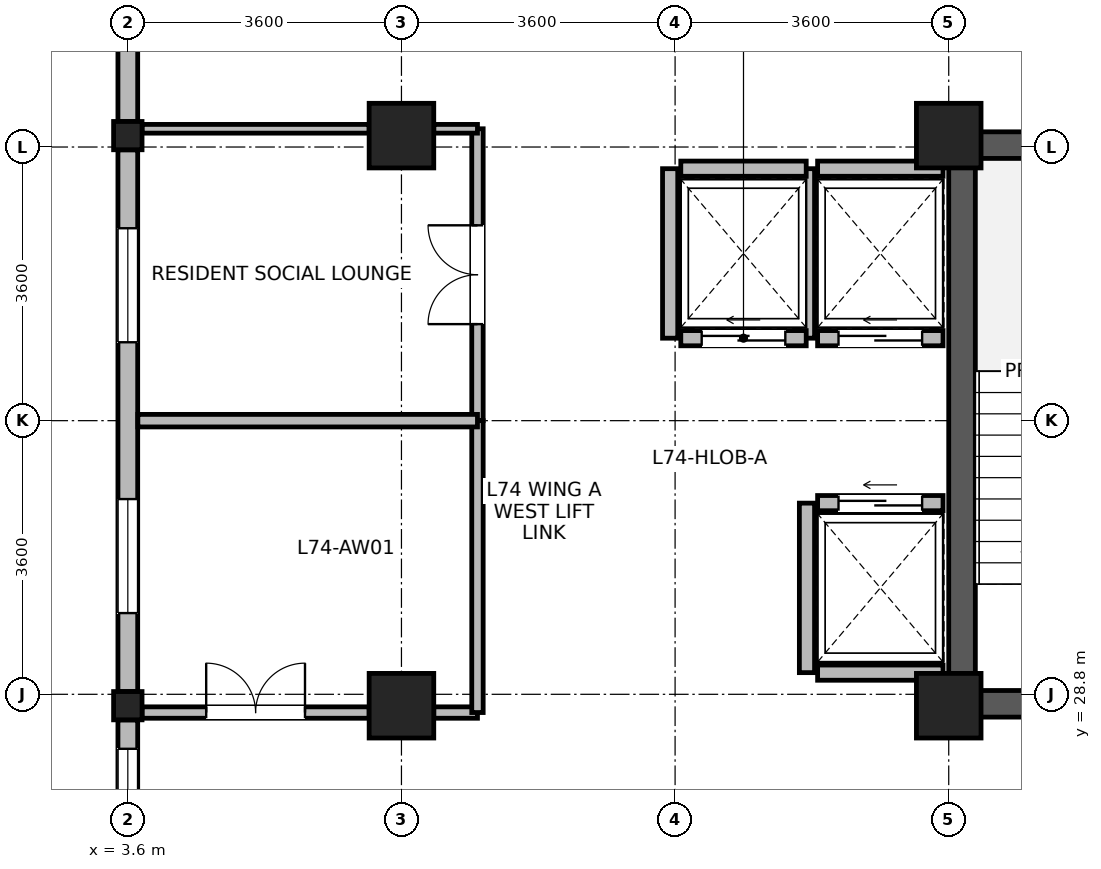
"""IFC4 building model, lengths in metres.
Left out: names, types, materials, properties, quantities, classifications, styles, units other than length and angle.
Written with IfcOpenShell. Run it as: python <this file> out.ifc"""

import sys

from ifc_helpers import new_model, si_unit, direction, frame, frame_2d, origin, origin_2d, place, context, subcontext, project, spatial, rectangle, i_section, extrude, source, transform, mapped, element, fill, save


model = new_model("IFC4")
c1 = context("Model", 3, precision=1e-05, world=origin(), true_north=direction((0.0, 1.0)))
c2 = subcontext(c1, "Body", "Model", "MODEL_VIEW")
j1 = project(units=[si_unit("LENGTHUNIT", "METRE"), si_unit("PLANEANGLEUNIT", "RADIAN")], contexts=[c1])
p1 = place(None, origin())
s1 = spatial("IfcSite", under=j1, at=p1, CompositionType="ELEMENT")
p2 = place(p1, origin())
s2 = spatial("IfcBuilding", under=s1, at=p2, CompositionType="ELEMENT")
p3 = place(p2, frame((0.0, 0.0, 286.9)))
s3 = spatial("IfcBuildingStorey", under=s2, at=p3, CompositionType="ELEMENT", Elevation=286.9)
p4 = place(p3, frame((14.575, 28.5, 0.0), z_axis=(0.0, 0.0, 1.0), x_axis=(0.0, 1.0, 0.0)))
e1 = element("IfcWall", 1, at=p4, inside=s3, PredefinedType="SHEAR", context=c2, shape_type="SweptSolid", body=[
    extrude(rectangle(XDim=7.7, YDim=0.35, at=frame_2d((3.85, 0.0))), origin(), (0.0, 0.0, 1.0), 3.475),
])
for number, where, z_axis, x_axis in (
    (2, (14.75, 28.675, 0.0), (0.0, 0.0, 1.0), (1.0, 0.0, 0.0)),
    (3, (14.75, 36.025, 0.0), (0.0, 0.0, 1.0), (1.0, 0.0, 0.0)),
):
    element("IfcWall", number, at=place(p3, frame(where, z_axis=z_axis, x_axis=x_axis)), inside=s3, PredefinedType="SHEAR", context=c2, shape_type="SweptSolid", body=[
        extrude(rectangle(XDim=3.2, YDim=0.35, at=frame_2d((1.6, 0.0))), origin(), (0.0, 0.0, 1.0), 3.475),
    ])
m1 = source(origin(), c2, "Body", "SweptSolid", [
    extrude(rectangle(XDim=0.85, YDim=0.85, at=origin_2d()), origin(), (0.0, 0.0, 1.0), 3.7),
])
for number, where, z_axis, x_axis in (
    (4, (7.2, 28.65, 0.0), (0.0, 0.0, 1.0), (1.0, 0.0, 0.0)),
    (5, (7.2, 36.15, 0.0), (0.0, 0.0, 1.0), (1.0, 0.0, 0.0)),
    (6, (14.4, 28.65, 0.0), (0.0, 0.0, 1.0), (1.0, 0.0, 0.0)),
    (7, (14.4, 36.15, 0.0), (0.0, 0.0, 1.0), (1.0, 0.0, 0.0)),
):
    element("IfcColumn", number, at=place(p3, frame(where, z_axis=z_axis, x_axis=x_axis)), inside=s3, PredefinedType="COLUMN", context=c2, shape_type="MappedRepresentation", body=[
        mapped(m1, transform((0.0, 0.0, 0.0), x_axis=(1.0, 0.0, 0.0), y_axis=(0.0, 1.0, 0.0), z_axis=(0.0, 0.0, 1.0), scale=1.0)),
    ])
m2 = source(origin(), c2, "Body", "SweptSolid", [
    extrude(i_section(OverallWidth=0.374, OverallDepth=0.372, WebThickness=0.015, FlangeThickness=0.026, FilletRadius=0.015, at=origin_2d()), origin(), (0.0, 0.0, 1.0), 3.7),
])
for number, where, z_axis, x_axis in (
    (8, (3.6, 28.65, 0.0), (0.0, 0.0, 1.0), (1.0, 0.0, 0.0)),
    (9, (3.6, 36.15, 0.0), (0.0, 0.0, 1.0), (1.0, 0.0, 0.0)),
):
    element("IfcColumn", number, at=place(p3, frame(where, z_axis=z_axis, x_axis=x_axis)), inside=s3, PredefinedType="COLUMN", context=c2, shape_type="MappedRepresentation", body=[
        mapped(m2, transform((0.0, 0.0, 0.0), x_axis=(1.0, 0.0, 0.0), y_axis=(0.0, 1.0, 0.0), z_axis=(0.0, 0.0, 1.0), scale=1.0)),
    ])
p5 = place(p3, frame((3.6, 36.337, 0.0), z_axis=(0.0, 0.0, 1.0), x_axis=(0.0, 1.0, 0.0)))
e10 = element("IfcWall", 10, at=p5, inside=s3, PredefinedType="STANDARD", context=c2, shape_type="SweptSolid", body=[
    extrude(rectangle(XDim=3.393, YDim=0.26, at=frame_2d((1.697, 0.0))), origin(), (0.0, 0.0, 1.0), 3.455),
])
p6 = place(p5, frame((0.947, 0.0, 0.85)))
e11 = element("IfcOpeningElement", 11, at=p6, cuts=e10, PredefinedType="OPENING", context=c2, shape_type="SweptSolid", body=[
    extrude(rectangle(XDim=1.5, YDim=1.85, at=frame_2d((0.75, 0.925))), frame((0.0, 0.14, 0.0), z_axis=(0.0, -1.0, 0.0), x_axis=(1.0, 0.0, 0.0)), (0.0, 0.0, 1.0), 0.28),
])
p7 = place(p3, frame((3.6, 28.837, 0.0), z_axis=(0.0, 0.0, 1.0), x_axis=(0.0, 1.0, 0.0)))
e12 = element("IfcWall", 12, at=p7, inside=s3, PredefinedType="STANDARD", context=c2, shape_type="SweptSolid", body=[
    extrude(rectangle(XDim=7.126, YDim=0.26, at=frame_2d((3.563, 0.0))), origin(), (0.0, 0.0, 1.0), 3.055),
])
p8 = place(p7, frame((1.031, 0.0, 0.85)))
e13 = element("IfcOpeningElement", 13, at=p8, cuts=e12, PredefinedType="OPENING", context=c2, shape_type="SweptSolid", body=[
    extrude(rectangle(XDim=1.5, YDim=1.85, at=frame_2d((0.75, 0.925))), frame((0.0, 0.14, 0.0), z_axis=(0.0, -1.0, 0.0), x_axis=(1.0, 0.0, 0.0)), (0.0, 0.0, 1.0), 0.28),
])
p9 = place(p7, frame((4.594, 0.0, 0.85)))
e14 = element("IfcOpeningElement", 14, at=p9, cuts=e12, PredefinedType="OPENING", context=c2, shape_type="SweptSolid", body=[
    extrude(rectangle(XDim=1.5, YDim=1.85, at=frame_2d((0.75, 0.925))), frame((0.0, 0.14, 0.0), z_axis=(0.0, -1.0, 0.0), x_axis=(1.0, 0.0, 0.0)), (0.0, 0.0, 1.0), 0.28),
])
p10 = place(p3, frame((3.6, 25.07, 0.0), z_axis=(0.0, 0.0, 1.0), x_axis=(0.0, 1.0, 0.0)))
e15 = element("IfcWall", 15, at=p10, inside=s3, PredefinedType="STANDARD", context=c2, shape_type="SweptSolid", body=[
    extrude(rectangle(XDim=3.393, YDim=0.26, at=frame_2d((1.696, 0.0))), origin(), (0.0, 0.0, 1.0), 3.455),
])
p11 = place(p10, frame((2.063, 0.0, 0.85)))
e16 = element("IfcOpeningElement", 16, at=p11, cuts=e15, PredefinedType="OPENING", context=c2, shape_type="SweptSolid", body=[
    extrude(rectangle(XDim=0.95, YDim=1.75, at=frame_2d((0.475, 0.875))), frame((0.0, 0.14, 0.0), z_axis=(0.0, -1.0, 0.0), x_axis=(1.0, 0.0, 0.0)), (0.0, 0.0, 1.0), 0.28),
])
p12 = place(p3, frame((12.675, 33.485, 0.0), z_axis=(0.0, 0.0, 1.0), x_axis=(1.0, 0.0, 0.0)))
e17 = element("IfcWall", 17, at=p12, inside=s3, PredefinedType="PARTITIONING", context=c2, shape_type="SweptSolid", body=[
    extrude(rectangle(XDim=1.65, YDim=0.2, at=frame_2d((0.825, 0.0))), origin(), (0.0, 0.0, 1.0), 3.455),
])
p13 = place(p12, frame((0.275, 0.0, 0.0)))
e18 = element("IfcOpeningElement", 18, at=p13, cuts=e17, PredefinedType="OPENING", context=c2, shape_type="SweptSolid", body=[
    extrude(rectangle(XDim=1.1, YDim=2.12, at=frame_2d((0.55, 1.06))), frame((0.0, 0.11, 0.0), z_axis=(0.0, -1.0, 0.0), x_axis=(1.0, 0.0, 0.0)), (0.0, 0.0, 1.0), 0.22),
])
p14 = place(p3, frame((12.675, 35.715, 0.0), z_axis=(0.0, 0.0, 1.0), x_axis=(1.0, 0.0, 0.0)))
e19 = element("IfcWall", 19, at=p14, inside=s3, PredefinedType="PARTITIONING", context=c2, shape_type="SweptSolid", body=[
    extrude(rectangle(XDim=1.65, YDim=0.2, at=frame_2d((0.825, 0.0))), origin(), (0.0, 0.0, 1.0), 3.455),
])
p15 = place(p3, frame((12.535, 33.485, 0.0), z_axis=(0.0, 0.0, 1.0), x_axis=(0.0, 1.0, 0.0)))
e20 = element("IfcWall", 20, at=p15, inside=s3, PredefinedType="PARTITIONING", context=c2, shape_type="SweptSolid", body=[
    extrude(rectangle(XDim=2.23, YDim=0.2, at=frame_2d((1.115, 0.0))), origin(), (0.0, 0.0, 1.0), 3.455),
])
p16 = place(p3, frame((12.675, 29.085, 0.0), z_axis=(0.0, 0.0, 1.0), x_axis=(1.0, 0.0, 0.0)))
e21 = element("IfcWall", 21, at=p16, inside=s3, PredefinedType="PARTITIONING", context=c2, shape_type="SweptSolid", body=[
    extrude(rectangle(XDim=1.65, YDim=0.2, at=frame_2d((0.825, 0.0))), origin(), (0.0, 0.0, 1.0), 3.455),
])
p17 = place(p3, frame((12.675, 31.315, 0.0), z_axis=(0.0, 0.0, 1.0), x_axis=(1.0, 0.0, 0.0)))
e22 = element("IfcWall", 22, at=p17, inside=s3, PredefinedType="PARTITIONING", context=c2, shape_type="SweptSolid", body=[
    extrude(rectangle(XDim=1.65, YDim=0.2, at=frame_2d((0.825, 0.0))), origin(), (0.0, 0.0, 1.0), 3.455),
])
p18 = place(p17, frame((0.275, 0.0, 0.0)))
e23 = element("IfcOpeningElement", 23, at=p18, cuts=e22, PredefinedType="OPENING", context=c2, shape_type="SweptSolid", body=[
    extrude(rectangle(XDim=1.1, YDim=2.12, at=frame_2d((0.55, 1.06))), frame((0.0, 0.11, 0.0), z_axis=(0.0, -1.0, 0.0), x_axis=(1.0, 0.0, 0.0)), (0.0, 0.0, 1.0), 0.22),
])
p19 = place(p3, frame((12.535, 29.085, 0.0), z_axis=(0.0, 0.0, 1.0), x_axis=(0.0, 1.0, 0.0)))
e24 = element("IfcWall", 24, at=p19, inside=s3, PredefinedType="PARTITIONING", context=c2, shape_type="SweptSolid", body=[
    extrude(rectangle(XDim=2.23, YDim=0.2, at=frame_2d((1.115, 0.0))), origin(), (0.0, 0.0, 1.0), 3.455),
])
p20 = place(p3, frame((10.875, 33.485, 0.0), z_axis=(0.0, 0.0, 1.0), x_axis=(1.0, 0.0, 0.0)))
e25 = element("IfcWall", 25, at=p20, inside=s3, PredefinedType="PARTITIONING", context=c2, shape_type="SweptSolid", body=[
    extrude(rectangle(XDim=1.65, YDim=0.2, at=frame_2d((0.825, 0.0))), origin(), (0.0, 0.0, 1.0), 3.455),
])
p21 = place(p20, frame((0.275, 0.0, 0.0)))
e26 = element("IfcOpeningElement", 26, at=p21, cuts=e25, PredefinedType="OPENING", context=c2, shape_type="SweptSolid", body=[
    extrude(rectangle(XDim=1.1, YDim=2.12, at=frame_2d((0.55, 1.06))), frame((0.0, 0.11, 0.0), z_axis=(0.0, -1.0, 0.0), x_axis=(1.0, 0.0, 0.0)), (0.0, 0.0, 1.0), 0.22),
])
p22 = place(p3, frame((10.875, 35.715, 0.0), z_axis=(0.0, 0.0, 1.0), x_axis=(1.0, 0.0, 0.0)))
e27 = element("IfcWall", 27, at=p22, inside=s3, PredefinedType="PARTITIONING", context=c2, shape_type="SweptSolid", body=[
    extrude(rectangle(XDim=1.65, YDim=0.2, at=frame_2d((0.825, 0.0))), origin(), (0.0, 0.0, 1.0), 3.455),
])
p23 = place(p3, frame((10.735, 33.485, 0.0), z_axis=(0.0, 0.0, 1.0), x_axis=(0.0, 1.0, 0.0)))
e28 = element("IfcWall", 28, at=p23, inside=s3, PredefinedType="PARTITIONING", context=c2, shape_type="SweptSolid", body=[
    extrude(rectangle(XDim=2.23, YDim=0.2, at=frame_2d((1.115, 0.0))), origin(), (0.0, 0.0, 1.0), 3.455),
])
p24 = place(p3, frame((3.787, 28.56, 0.0), z_axis=(0.0, 0.0, 1.0), x_axis=(1.0, 0.0, 0.0)))
e29 = element("IfcWall", 29, at=p24, inside=s3, PredefinedType="PARTITIONING", context=c2, shape_type="SweptSolid", body=[
    extrude(rectangle(XDim=2.988, YDim=0.15, at=frame_2d((1.494, 0.0))), origin(), (0.0, 0.0, 1.0), 2.905),
])
p25 = place(p24, frame((0.844, 0.0, 0.0)))
e30 = element("IfcOpeningElement", 30, at=p25, cuts=e29, PredefinedType="OPENING", context=c2, shape_type="SweptSolid", body=[
    extrude(rectangle(XDim=1.3, YDim=2.12, at=frame_2d((0.65, 1.06))), frame((0.0, 0.085, 0.0), z_axis=(0.0, -1.0, 0.0), x_axis=(1.0, 0.0, 0.0)), (0.0, 0.0, 1.0), 0.17),
])
p26 = place(p3, frame((7.625, 28.56, 0.0), z_axis=(0.0, 0.0, 1.0), x_axis=(1.0, 0.0, 0.0)))
e31 = element("IfcWall", 31, at=p26, inside=s3, PredefinedType="PARTITIONING", context=c2, shape_type="SweptSolid", body=[
    extrude(rectangle(XDim=0.575, YDim=0.15, at=frame_2d((0.288, 0.0))), origin(), (0.0, 0.0, 1.0), 2.905),
])
p27 = place(p3, frame((8.2, 32.4, 0.0), z_axis=(0.0, 0.0, 1.0), x_axis=(0.0, 1.0, 0.0)))
e32 = element("IfcWall", 32, at=p27, inside=s3, PredefinedType="PARTITIONING", context=c2, shape_type="SweptSolid", body=[
    extrude(rectangle(XDim=3.84, YDim=0.15, at=frame_2d((1.92, 0.0))), origin(), (0.0, 0.0, 1.0), 3.455),
])
p28 = place(p27, frame((1.27, 0.0, 0.0)))
e33 = element("IfcOpeningElement", 33, at=p28, cuts=e32, PredefinedType="OPENING", context=c2, shape_type="SweptSolid", body=[
    extrude(rectangle(XDim=1.3, YDim=2.12, at=frame_2d((0.65, 1.06))), frame((0.0, 0.085, 0.0), z_axis=(0.0, -1.0, 0.0), x_axis=(1.0, 0.0, 0.0)), (0.0, 0.0, 1.0), 0.17),
])
p29 = place(p3, frame((8.2, 28.56, 0.0), z_axis=(0.0, 0.0, 1.0), x_axis=(0.0, 1.0, 0.0)))
e34 = element("IfcWall", 34, at=p29, inside=s3, PredefinedType="PARTITIONING", context=c2, shape_type="SweptSolid", body=[
    extrude(rectangle(XDim=3.84, YDim=0.15, at=frame_2d((1.92, 0.0))), origin(), (0.0, 0.0, 1.0), 3.455),
])
p30 = place(p3, frame((3.732, 32.4, 0.0), z_axis=(0.0, 0.0, 1.0), x_axis=(1.0, 0.0, 0.0)))
e35 = element("IfcWall", 35, at=p30, inside=s3, PredefinedType="PARTITIONING", context=c2, shape_type="SweptSolid", body=[
    extrude(rectangle(XDim=4.468, YDim=0.165, at=frame_2d((2.234, 0.0))), origin(), (0.0, 0.0, 1.0), 3.455),
])
p31 = place(p3, frame((3.787, 36.24, 0.0), z_axis=(0.0, 0.0, 1.0), x_axis=(1.0, 0.0, 0.0)))
e36 = element("IfcWall", 36, at=p31, inside=s3, PredefinedType="PARTITIONING", context=c2, shape_type="SweptSolid", body=[
    extrude(rectangle(XDim=2.988, YDim=0.115, at=frame_2d((1.494, 0.0))), origin(), (0.0, 0.0, 1.0), 2.905),
])
p32 = place(p3, frame((7.625, 36.24, 0.0), z_axis=(0.0, 0.0, 1.0), x_axis=(1.0, 0.0, 0.0)))
e37 = element("IfcWall", 37, at=p32, inside=s3, PredefinedType="PARTITIONING", context=c2, shape_type="SweptSolid", body=[
    extrude(rectangle(XDim=0.575, YDim=0.115, at=frame_2d((0.288, 0.0))), origin(), (0.0, 0.0, 1.0), 2.905),
])
p33 = place(p8, origin())
e38 = element("IfcWindow", 38, at=p33, inside=s3, PartitioningType="SINGLE_PANEL", PredefinedType="WINDOW", context=c2, shape_type="SweptSolid", body=[
    extrude(rectangle(XDim=1.5, YDim=1.85, at=frame_2d((0.75, 0.925))), frame((0.0, 0.03, 0.0), z_axis=(0.0, -1.0, 0.0), x_axis=(1.0, 0.0, 0.0)), (0.0, 0.0, 1.0), 0.06),
])
fill(e13, e38)
p34 = place(p9, origin())
e39 = element("IfcWindow", 39, at=p34, inside=s3, PartitioningType="SINGLE_PANEL", PredefinedType="WINDOW", context=c2, shape_type="SweptSolid", body=[
    extrude(rectangle(XDim=1.5, YDim=1.85, at=frame_2d((0.75, 0.925))), frame((0.0, 0.03, 0.0), z_axis=(0.0, -1.0, 0.0), x_axis=(1.0, 0.0, 0.0)), (0.0, 0.0, 1.0), 0.06),
])
fill(e14, e39)
p35 = place(p11, origin())
e40 = element("IfcWindow", 40, at=p35, inside=s3, PartitioningType="SINGLE_PANEL", PredefinedType="WINDOW", context=c2, shape_type="SweptSolid", body=[
    extrude(rectangle(XDim=0.95, YDim=1.75, at=frame_2d((0.475, 0.875))), frame((0.0, 0.03, 0.0), z_axis=(0.0, -1.0, 0.0), x_axis=(1.0, 0.0, 0.0)), (0.0, 0.0, 1.0), 0.06),
])
fill(e16, e40)
p36 = place(p13, origin())
e41 = element("IfcDoor", 41, at=p36, inside=s3, OperationType="SLIDING_TO_LEFT", PredefinedType="DOOR", context=c2, shape_type="SweptSolid", body=[
    extrude(rectangle(XDim=1.1, YDim=2.12, at=frame_2d((0.55, 1.06))), frame((0.0, 0.025, 0.0), z_axis=(0.0, -1.0, 0.0), x_axis=(1.0, 0.0, 0.0)), (0.0, 0.0, 1.0), 0.05),
])
fill(e18, e41)
p37 = place(p18, origin())
e42 = element("IfcDoor", 42, at=p37, inside=s3, OperationType="SLIDING_TO_LEFT", PredefinedType="DOOR", context=c2, shape_type="SweptSolid", body=[
    extrude(rectangle(XDim=1.1, YDim=2.12, at=frame_2d((0.55, 1.06))), frame((0.0, 0.025, 0.0), z_axis=(0.0, -1.0, 0.0), x_axis=(1.0, 0.0, 0.0)), (0.0, 0.0, 1.0), 0.05),
])
fill(e23, e42)
p38 = place(p21, origin())
e43 = element("IfcDoor", 43, at=p38, inside=s3, OperationType="SLIDING_TO_LEFT", PredefinedType="DOOR", context=c2, shape_type="SweptSolid", body=[
    extrude(rectangle(XDim=1.1, YDim=2.12, at=frame_2d((0.55, 1.06))), frame((0.0, 0.025, 0.0), z_axis=(0.0, -1.0, 0.0), x_axis=(1.0, 0.0, 0.0)), (0.0, 0.0, 1.0), 0.05),
])
fill(e26, e43)
p39 = place(p25, origin())
e44 = element("IfcDoor", 44, at=p39, inside=s3, OperationType="DOUBLE_DOOR_SINGLE_SWING", PredefinedType="DOOR", context=c2, shape_type="SweptSolid", body=[
    extrude(rectangle(XDim=1.3, YDim=2.12, at=frame_2d((0.65, 1.06))), frame((0.0, 0.025, 0.0), z_axis=(0.0, -1.0, 0.0), x_axis=(1.0, 0.0, 0.0)), (0.0, 0.0, 1.0), 0.05),
])
fill(e30, e44)
p40 = place(p28, origin())
e45 = element("IfcDoor", 45, at=p40, inside=s3, OperationType="DOUBLE_DOOR_SINGLE_SWING", PredefinedType="DOOR", context=c2, shape_type="SweptSolid", body=[
    extrude(rectangle(XDim=1.3, YDim=2.12, at=frame_2d((0.65, 1.06))), frame((0.0, 0.025, 0.0), z_axis=(0.0, -1.0, 0.0), x_axis=(1.0, 0.0, 0.0)), (0.0, 0.0, 1.0), 0.05),
])
fill(e33, e45)
save(model, sys.argv[1])
